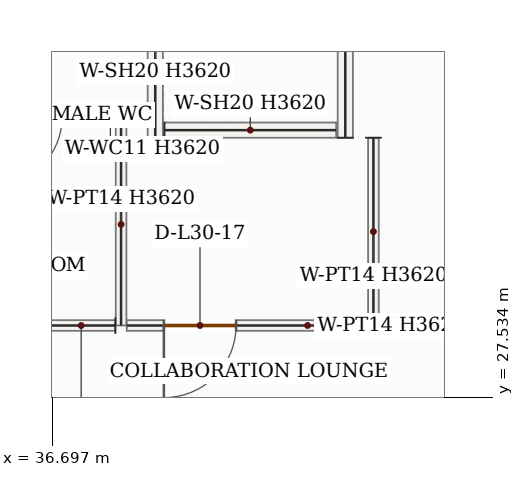
"""IFC4 building model, lengths in metres.
Left out: names, types, materials, properties, quantities, classifications, styles, units other than length and angle.
Written with IfcOpenShell. Run it as: python <this file> out.ifc"""

import sys

from ifc_helpers import new_model, si_unit, direction, frame, frame_2d, origin, place, context, subcontext, project, spatial, rectangle, extrude, source, transform, mapped, element, fill, save


model = new_model("IFC4")
c1 = context("Model", 3, precision=1e-05, world=origin(), true_north=direction((0.0, 1.0)))
c2 = subcontext(c1, "Body", "Model", "MODEL_VIEW")
j1 = project(units=[si_unit("LENGTHUNIT", "METRE"), si_unit("PLANEANGLEUNIT", "RADIAN")], contexts=[c1])
p1 = place(None, origin())
s1 = spatial("IfcSite", under=j1, at=p1, CompositionType="ELEMENT")
p2 = place(p1, origin())
s2 = spatial("IfcBuilding", under=s1, at=p2, CompositionType="ELEMENT")
p3 = place(p2, frame((0.0, 0.0, 135.6)))
s3 = spatial("IfcBuildingStorey", under=s2, at=p3, CompositionType="ELEMENT", Elevation=135.6)
m1 = source(origin(), c2, "Body", "SweptSolid", [
    extrude(rectangle(XDim=2.4, YDim=0.2, at=frame_2d((1.2, 0.0))), origin(), (0.0, 0.0, 1.0), 3.62),
])
for number, where, z_axis, x_axis in (
    (1, (38.05, 30.95, 0.0), (0.0, 0.0, 1.0), (0.0, 1.0, 0.0)),
    (2, (40.55, 30.95, 0.0), (0.0, 0.0, 1.0), (0.0, 1.0, 0.0)),
):
    element("IfcWall", number, at=place(p3, frame(where, z_axis=z_axis, x_axis=x_axis)), inside=s3, PredefinedType="SOLIDWALL", context=c2, shape_type="MappedRepresentation", body=[
        mapped(m1, transform((0.0, 0.0, 0.0), x_axis=(1.0, 0.0, 0.0), y_axis=(0.0, 1.0, 0.0), z_axis=(0.0, 0.0, 1.0), scale=1.0)),
    ])
m2 = source(origin(), c2, "Body", "SweptSolid", [
    extrude(rectangle(XDim=2.26, YDim=0.2, at=frame_2d((1.13, 0.0))), origin(), (0.0, 0.0, 1.0), 3.62),
])
p4 = place(p3, frame((38.17, 31.05, 0.0), z_axis=(0.0, 0.0, 1.0), x_axis=(1.0, 0.0, 0.0)))
e3 = element("IfcWall", 3, at=p4, inside=s3, PredefinedType="SOLIDWALL", context=c2, shape_type="MappedRepresentation", body=[
    mapped(m2, transform((0.0, 0.0, 0.0), x_axis=(1.0, 0.0, 0.0), y_axis=(0.0, 1.0, 0.0), z_axis=(0.0, 0.0, 1.0), scale=1.0)),
])
p5 = place(p3, frame((37.945, 31.22, 0.0), z_axis=(0.0, 0.0, 1.0), x_axis=(-1.0, 0.0, 0.0)))
e4 = element("IfcWall", 4, at=p5, inside=s3, PredefinedType="PARTITIONING", context=c2, shape_type="SweptSolid", body=[
    extrude(rectangle(XDim=2.355, YDim=0.115, at=frame_2d((1.177, 0.0))), origin(), (0.0, 0.0, 1.0), 3.62),
])
p6 = place(p5, frame((1.121, 0.0, 0.0)))
e5 = element("IfcOpeningElement", 5, at=p6, cuts=e4, PredefinedType="OPENING", context=c2, shape_type="SweptSolid", body=[
    extrude(rectangle(XDim=0.9, YDim=2.1, at=frame_2d((0.45, 1.05))), frame((0.0, 0.067, 0.0), z_axis=(0.0, -1.0, 0.0), x_axis=(1.0, 0.0, 0.0)), (0.0, 0.0, 1.0), 0.135),
])
m3 = source(origin(), c2, "Body", "SweptSolid", [
    extrude(rectangle(XDim=2.66, YDim=0.14, at=frame_2d((1.33, 0.0))), origin(), (0.0, 0.0, 1.0), 3.62),
])
p7 = place(p3, frame((37.6, 31.14, 0.0), z_axis=(0.0, 0.0, 1.0), x_axis=(0.0, -1.0, 0.0)))
e6 = element("IfcWall", 6, at=p7, inside=s3, PredefinedType="PARTITIONING", context=c2, shape_type="MappedRepresentation", body=[
    mapped(m3, transform((0.0, 0.0, 0.0), x_axis=(1.0, 0.0, 0.0), y_axis=(0.0, 1.0, 0.0), z_axis=(0.0, 0.0, 1.0), scale=1.0)),
])
p8 = place(p3, frame((37.525, 28.48, 0.0), z_axis=(0.0, 0.0, 1.0), x_axis=(-1.0, 0.0, 0.0)))
e7 = element("IfcWall", 7, at=p8, inside=s3, PredefinedType="PARTITIONING", context=c2, shape_type="SweptSolid", body=[
    extrude(rectangle(XDim=3.05, YDim=0.14, at=frame_2d((1.525, 0.0))), origin(), (0.0, 0.0, 1.0), 3.62),
])
p9 = place(p8, frame((1.05, 0.0, 0.0)))
e8 = element("IfcOpeningElement", 8, at=p9, cuts=e7, PredefinedType="OPENING", context=c2, shape_type="SweptSolid", body=[
    extrude(rectangle(XDim=0.95, YDim=2.15, at=frame_2d((0.475, 1.075))), frame((0.0, 0.08, 0.0), z_axis=(0.0, -1.0, 0.0), x_axis=(1.0, 0.0, 0.0)), (0.0, 0.0, 1.0), 0.16),
])
m4 = source(origin(), c2, "Body", "SweptSolid", [
    extrude(rectangle(XDim=2.47, YDim=0.14, at=frame_2d((1.235, 0.0))), origin(), (0.0, 0.0, 1.0), 3.62),
])
p10 = place(p3, frame((40.92, 30.95, 0.0), z_axis=(0.0, 0.0, 1.0), x_axis=(0.0, -1.0, 0.0)))
e9 = element("IfcWall", 9, at=p10, inside=s3, PredefinedType="PARTITIONING", context=c2, shape_type="MappedRepresentation", body=[
    mapped(m4, transform((0.0, 0.0, 0.0), x_axis=(1.0, 0.0, 0.0), y_axis=(0.0, 1.0, 0.0), z_axis=(0.0, 0.0, 1.0), scale=1.0)),
])
p11 = place(p3, frame((40.845, 28.48, 0.0), z_axis=(0.0, 0.0, 1.0), x_axis=(-1.0, 0.0, 0.0)))
e10 = element("IfcWall", 10, at=p11, inside=s3, PredefinedType="PARTITIONING", context=c2, shape_type="SweptSolid", body=[
    extrude(rectangle(XDim=3.17, YDim=0.14, at=frame_2d((1.585, 0.0))), origin(), (0.0, 0.0, 1.0), 3.62),
])
p12 = place(p11, frame((1.732, 0.0, 0.0)))
e11 = element("IfcOpeningElement", 11, at=p12, cuts=e10, PredefinedType="OPENING", context=c2, shape_type="SweptSolid", body=[
    extrude(rectangle(XDim=0.95, YDim=2.15, at=frame_2d((0.475, 1.075))), frame((0.0, 0.08, 0.0), z_axis=(0.0, -1.0, 0.0), x_axis=(1.0, 0.0, 0.0)), (0.0, 0.0, 1.0), 0.16),
])
m5 = source(origin(), c2, "Body", "SweptSolid", [
    extrude(rectangle(XDim=0.95, YDim=2.15, at=frame_2d((0.475, 1.075))), frame((0.0, 0.025, 0.0), z_axis=(0.0, -1.0, 0.0), x_axis=(1.0, 0.0, 0.0)), (0.0, 0.0, 1.0), 0.05),
])
p13 = place(p12, origin())
e12 = element("IfcDoor", 12, at=p13, inside=s3, OperationType="SINGLE_SWING_RIGHT", PredefinedType="DOOR", context=c2, shape_type="MappedRepresentation", body=[
    mapped(m5, transform((0.0, 0.0, 0.0), x_axis=(1.0, 0.0, 0.0), y_axis=(0.0, 1.0, 0.0), z_axis=(0.0, 0.0, 1.0), scale=1.0)),
])
fill(e11, e12)
m6 = source(origin(), c2, "Body", "SweptSolid", [
    extrude(rectangle(XDim=0.9, YDim=2.1, at=frame_2d((0.45, 1.05))), frame((0.0, 0.025, 0.0), z_axis=(0.0, -1.0, 0.0), x_axis=(1.0, 0.0, 0.0)), (0.0, 0.0, 1.0), 0.05),
])
p14 = place(p6, origin())
e13 = element("IfcDoor", 13, at=p14, inside=s3, OperationType="SINGLE_SWING_RIGHT", PredefinedType="DOOR", context=c2, shape_type="MappedRepresentation", body=[
    mapped(m6, transform((0.0, 0.0, 0.0), x_axis=(1.0, 0.0, 0.0), y_axis=(0.0, 1.0, 0.0), z_axis=(0.0, 0.0, 1.0), scale=1.0)),
])
fill(e5, e13)
save(model, sys.argv[1])
